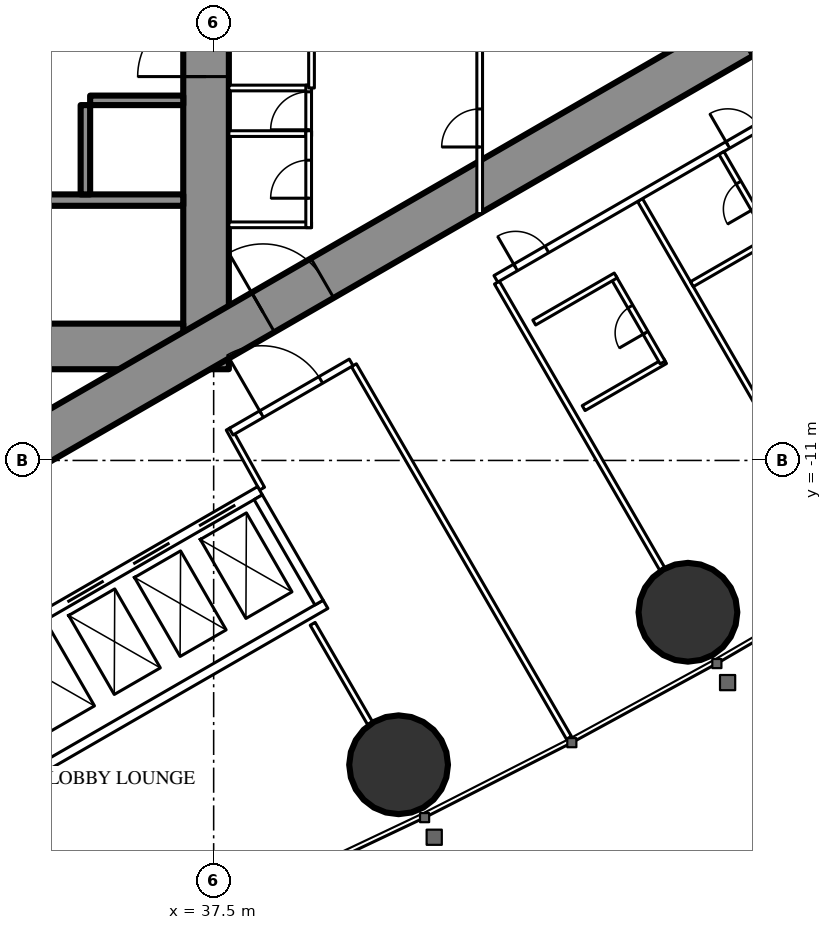
"""IFC4 building model, lengths in metres.
Left out: names, types, materials, properties, quantities, classifications, styles, units other than length and angle.
Written with IfcOpenShell. Run it as: python <this file> out.ifc"""

import sys

from ifc_helpers import new_model, si_unit, direction, frame, frame_2d, origin, origin_2d, place, context, subcontext, project, spatial, rectangle, hollow_circle, extrude, element, fill, save


model = new_model("IFC4")
c1 = context("Model", 3, precision=1e-05, world=origin(), true_north=direction((0.0, 1.0)))
c2 = subcontext(c1, "Body", "Model", "MODEL_VIEW")
j1 = project(units=[si_unit("LENGTHUNIT", "METRE"), si_unit("PLANEANGLEUNIT", "RADIAN")], contexts=[c1])
p1 = place(None, origin())
s1 = spatial("IfcSite", under=j1, at=p1, CompositionType="ELEMENT")
p2 = place(p1, origin())
s2 = spatial("IfcBuilding", under=s1, at=p2, CompositionType="ELEMENT")
p3 = place(p2, frame((0.0, 0.0, 125.6)))
s3 = spatial("IfcBuildingStorey", under=s2, at=p3, CompositionType="ELEMENT", Elevation=125.6)
for number, where, z_axis, x_axis in (
    (1, (42.366, -19.007, 0.0), (0.0, 0.0, 1.0), (1.0, 0.0, 0.0)),
    (2, (49.979, -14.994, 0.0), (0.0, 0.0, 1.0), (1.0, 0.0, 0.0)),
):
    element("IfcColumn", number, at=place(p3, frame(where, z_axis=z_axis, x_axis=x_axis)), inside=s3, PredefinedType="COLUMN", context=c2, shape_type="SweptSolid", body=[
        extrude(hollow_circle(Radius=1.3, WallThickness=0.1, at=origin_2d()), origin(), (0.0, 0.0, 1.0), 3.5),
    ])
p4 = place(p3, frame((37.3, -8.6, 0.0), z_axis=(0.0, 0.0, 1.0), x_axis=(0.0, 1.0, 0.0)))
e3 = element("IfcWall", 3, at=p4, inside=s3, PredefinedType="SHEAR", context=c2, shape_type="SweptSolid", body=[
    extrude(rectangle(XDim=17.2, YDim=1.2, at=frame_2d((8.6, 0.0))), origin(), (0.0, 0.0, 1.0), 3.5),
])
p5 = place(p4, frame((7.7, 0.0, 0.0)))
e4 = element("IfcOpeningElement", 4, at=p5, cuts=e3, PredefinedType="OPENING", context=c2, shape_type="SweptSolid", body=[
    extrude(rectangle(XDim=1.8, YDim=2.2, at=frame_2d((0.9, 1.1))), frame((0.0, 0.61, 0.0), z_axis=(0.0, -1.0, 0.0), x_axis=(1.0, 0.0, 0.0)), (0.0, 0.0, 1.0), 1.22),
])
p6 = place(p3, frame((28.3, -8.0, 0.0), z_axis=(0.0, 0.0, 1.0), x_axis=(1.0, 0.0, 0.0)))
e5 = element("IfcWall", 5, at=p6, inside=s3, PredefinedType="SHEAR", context=c2, shape_type="SweptSolid", body=[
    extrude(rectangle(XDim=8.4, YDim=1.2, at=frame_2d((4.2, 0.0))), origin(), (0.0, 0.0, 1.0), 3.5),
])
p7 = place(p6, frame((0.25, 0.0, 0.0)))
e6 = element("IfcOpeningElement", 6, at=p7, cuts=e5, PredefinedType="OPENING", context=c2, shape_type="SweptSolid", body=[
    extrude(rectangle(XDim=1.0, YDim=2.2, at=frame_2d((0.5, 1.1))), frame((0.0, 0.61, 0.0), z_axis=(0.0, -1.0, 0.0), x_axis=(1.0, 0.0, 0.0)), (0.0, 0.0, 1.0), 1.22),
])
p8 = place(p3, frame((28.3, -4.15, 0.0), z_axis=(0.0, 0.0, 1.0), x_axis=(1.0, 0.0, 0.0)))
e7 = element("IfcWall", 7, at=p8, inside=s3, PredefinedType="SHEAR", context=c2, shape_type="SweptSolid", body=[
    extrude(rectangle(XDim=8.4, YDim=0.3, at=frame_2d((4.2, 0.0))), origin(), (0.0, 0.0, 1.0), 3.5),
])
p9 = place(p3, frame((34.125, -4.0, 0.0), z_axis=(0.0, 0.0, 1.0), x_axis=(0.0, 1.0, 0.0)))
e8 = element("IfcWall", 8, at=p9, inside=s3, PredefinedType="SHEAR", context=c2, shape_type="SweptSolid", body=[
    extrude(rectangle(XDim=2.35, YDim=0.25, at=frame_2d((1.175, 0.0))), origin(), (0.0, 0.0, 1.0), 3.5),
])
p10 = place(p3, frame((34.25, -1.525, 0.0), z_axis=(0.0, 0.0, 1.0), x_axis=(1.0, 0.0, 0.0)))
e9 = element("IfcWall", 9, at=p10, inside=s3, PredefinedType="SHEAR", context=c2, shape_type="SweptSolid", body=[
    extrude(rectangle(XDim=2.45, YDim=0.25, at=frame_2d((1.225, 0.0))), origin(), (0.0, 0.0, 1.0), 3.5),
])
p11 = place(p3, frame((27.2, -13.8, 0.0), z_axis=(0.0, 0.0, 1.0), x_axis=(0.866027159892, 0.499996958321, 0.0)))
e10 = element("IfcWall", 10, at=p11, inside=s3, PredefinedType="SHEAR", context=c2, shape_type="SweptSolid", body=[
    extrude(rectangle(XDim=27.947, YDim=1.2, at=frame_2d((13.973, 0.0))), origin(), (0.0, 0.0, 1.0), 3.5),
])
p12 = place(p11, frame((4.6, 0.0, 0.0)))
e11 = element("IfcOpeningElement", 11, at=p12, cuts=e10, PredefinedType="OPENING", context=c2, shape_type="SweptSolid", body=[
    extrude(rectangle(XDim=1.0, YDim=2.2, at=frame_2d((0.5, 1.1))), frame((0.0, 0.61, 0.0), z_axis=(0.0, -1.0, 0.0), x_axis=(1.0, 0.0, 0.0)), (0.0, 0.0, 1.0), 1.22),
])
p13 = place(p11, frame((13.395, 0.0, 0.0)))
e12 = element("IfcOpeningElement", 12, at=p13, cuts=e10, PredefinedType="OPENING", context=c2, shape_type="SweptSolid", body=[
    extrude(rectangle(XDim=1.8, YDim=2.2, at=frame_2d((0.9, 1.1))), frame((0.0, 0.61, 0.0), z_axis=(0.0, -1.0, 0.0), x_axis=(1.0, 0.0, 0.0)), (0.0, 0.0, 1.0), 1.22),
])
p14 = place(p3, frame((41.19, -8.494, 0.0), z_axis=(0.0, 0.0, 1.0), x_axis=(0.49999258054, -0.866029687369, 0.0)))
e13 = element("IfcWall", 13, at=p14, inside=s3, PredefinedType="PARTITIONING", context=c2, shape_type="SweptSolid", body=[
    extrude(rectangle(XDim=11.318, YDim=0.15, at=frame_2d((5.659, 0.0))), origin(), (0.0, 0.0, 1.0), 3.25),
])
p15 = place(p3, frame((44.954, -6.321, 0.0), z_axis=(0.0, 0.0, 1.0), x_axis=(0.500018676722, -0.866014620505, 0.0)))
e14 = element("IfcWall", 14, at=p15, inside=s3, PredefinedType="PARTITIONING", context=c2, shape_type="SweptSolid", body=[
    extrude(rectangle(XDim=8.704, YDim=0.15, at=frame_2d((4.352, 0.0))), origin(), (0.0, 0.0, 1.0), 2.2),
])
p16 = place(p3, frame((48.719, -4.147, 0.0), z_axis=(0.0, 0.0, 1.0), x_axis=(0.499990498062, -0.866030889661, 0.0)))
e15 = element("IfcWall", 15, at=p16, inside=s3, PredefinedType="PARTITIONING", context=c2, shape_type="SweptSolid", body=[
    extrude(rectangle(XDim=11.406, YDim=0.15, at=frame_2d((5.703, 0.0))), origin(), (0.0, 0.0, 1.0), 3.25),
])
p17 = place(p3, frame((40.105, -15.299, 0.0), z_axis=(0.0, 0.0, 1.0), x_axis=(0.499978822259, -0.866037630414, 0.0)))
e16 = element("IfcWall", 16, at=p17, inside=s3, PredefinedType="PARTITIONING", context=c2, shape_type="SweptSolid", body=[
    extrude(rectangle(XDim=3.023, YDim=0.15, at=frame_2d((1.511, 0.0))), origin(), (0.0, 0.0, 1.0), 3.25),
])
p18 = place(p3, frame((38.773, -11.742, 0.0), z_axis=(0.0, 0.0, 1.0), x_axis=(-0.485528096672, 0.8742210632, 0.0)))
e17 = element("IfcWall", 17, at=p18, inside=s3, PredefinedType="PARTITIONING", context=c2, shape_type="SweptSolid", body=[
    extrude(rectangle(XDim=1.805, YDim=0.15, at=frame_2d((0.903, 0.0))), origin(), (0.0, 0.0, 1.0), 3.25),
])
p19 = place(p3, frame((37.96, -10.243, 0.0), z_axis=(0.0, 0.0, 1.0), x_axis=(0.866042886279, 0.499969718208, 0.0)))
e18 = element("IfcWall", 18, at=p19, inside=s3, PredefinedType="PARTITIONING", context=c2, shape_type="SweptSolid", body=[
    extrude(rectangle(XDim=3.647, YDim=0.2, at=frame_2d((1.823, 0.0))), origin(), (0.0, 0.0, 1.0), 3.25),
])
p20 = place(p19, frame((0.923, 0.0, 0.0)))
e19 = element("IfcOpeningElement", 19, at=p20, cuts=e18, PredefinedType="OPENING", context=c2, shape_type="SweptSolid", body=[
    extrude(rectangle(XDim=1.8, YDim=2.2, at=frame_2d((0.9, 1.1))), frame((0.0, 0.11, 0.0), z_axis=(0.0, -1.0, 0.0), x_axis=(1.0, 0.0, 0.0)), (0.0, 0.0, 1.0), 0.22),
])
p21 = place(p3, frame((44.925, -6.222, 0.0), z_axis=(0.0, 0.0, 1.0), x_axis=(0.866020269055, 0.500008893506, 0.0)))
e20 = element("IfcWall", 20, at=p21, inside=s3, PredefinedType="PARTITIONING", context=c2, shape_type="SweptSolid", body=[
    extrude(rectangle(XDim=12.444, YDim=0.2, at=frame_2d((6.222, 0.0))), origin(), (0.0, 0.0, 1.0), 3.25),
])
p22 = place(p21, frame((0.6, 0.0, 0.0)))
e21 = element("IfcOpeningElement", 21, at=p22, cuts=e20, PredefinedType="OPENING", context=c2, shape_type="SweptSolid", body=[
    extrude(rectangle(XDim=0.95, YDim=2.2, at=frame_2d((0.475, 1.1))), frame((0.0, 0.11, 0.0), z_axis=(0.0, -1.0, 0.0), x_axis=(1.0, 0.0, 0.0)), (0.0, 0.0, 1.0), 0.22),
])
p23 = place(p21, frame((7.047, 0.0, 0.0)))
e22 = element("IfcOpeningElement", 22, at=p23, cuts=e20, PredefinedType="OPENING", context=c2, shape_type="SweptSolid", body=[
    extrude(rectangle(XDim=0.95, YDim=2.2, at=frame_2d((0.475, 1.1))), frame((0.0, 0.11, 0.0), z_axis=(0.0, -1.0, 0.0), x_axis=(1.0, 0.0, 0.0)), (0.0, 0.0, 1.0), 0.22),
])
p24 = place(p3, frame((47.235, -9.623, 0.0), z_axis=(0.0, 0.0, 1.0), x_axis=(0.866006523861, 0.500032699561, 0.0)))
e23 = element("IfcWall", 23, at=p24, inside=s3, PredefinedType="PARTITIONING", context=c2, shape_type="SweptSolid", body=[
    extrude(rectangle(XDim=2.475, YDim=0.15, at=frame_2d((1.237, 0.0))), origin(), (0.0, 0.0, 1.0), 3.25),
])
p25 = place(p3, frame((48.013, -6.171, 0.0), z_axis=(0.0, 0.0, 1.0), x_axis=(0.500006934395, -0.866021400173, 0.0)))
e24 = element("IfcWall", 24, at=p25, inside=s3, PredefinedType="PARTITIONING", context=c2, shape_type="SweptSolid", body=[
    extrude(rectangle(XDim=2.6, YDim=0.15, at=frame_2d((1.3, 0.0))), origin(), (0.0, 0.0, 1.0), 3.25),
])
p26 = place(p25, frame((0.9, 0.0, 0.0)))
e25 = element("IfcOpeningElement", 25, at=p26, cuts=e24, PredefinedType="OPENING", context=c2, shape_type="SweptSolid", body=[
    extrude(rectangle(XDim=0.8, YDim=2.2, at=frame_2d((0.4, 1.1))), frame((0.0, 0.085, 0.0), z_axis=(0.0, -1.0, 0.0), x_axis=(1.0, 0.0, 0.0)), (0.0, 0.0, 1.0), 0.17),
])
p27 = place(p3, frame((45.935, -7.371, 0.0), z_axis=(0.0, 0.0, 1.0), x_axis=(0.866031185235, 0.4999899861, 0.0)))
e26 = element("IfcWall", 26, at=p27, inside=s3, PredefinedType="PARTITIONING", context=c2, shape_type="SweptSolid", body=[
    extrude(rectangle(XDim=2.475, YDim=0.15, at=frame_2d((1.238, 0.0))), origin(), (0.0, 0.0, 1.0), 3.25),
])
p28 = place(p3, frame((50.083, -6.362, 0.0), z_axis=(0.0, 0.0, 1.0), x_axis=(0.866006523861, 0.500032699561, 0.0)))
e27 = element("IfcWall", 27, at=p28, inside=s3, PredefinedType="PARTITIONING", context=c2, shape_type="SweptSolid", body=[
    extrude(rectangle(XDim=2.475, YDim=0.15, at=frame_2d((1.237, 0.0))), origin(), (0.0, 0.0, 1.0), 3.25),
])
p29 = place(p3, frame((50.862, -2.91, 0.0), z_axis=(0.0, 0.0, 1.0), x_axis=(0.500047596559, -0.865997922154, 0.0)))
e28 = element("IfcWall", 28, at=p29, inside=s3, PredefinedType="PARTITIONING", context=c2, shape_type="SweptSolid", body=[
    extrude(rectangle(XDim=2.6, YDim=0.15, at=frame_2d((1.3, 0.0))), origin(), (0.0, 0.0, 1.0), 3.25),
])
p30 = place(p29, frame((0.9, 0.0, 0.0)))
e29 = element("IfcOpeningElement", 29, at=p30, cuts=e28, PredefinedType="OPENING", context=c2, shape_type="SweptSolid", body=[
    extrude(rectangle(XDim=0.8, YDim=2.2, at=frame_2d((0.4, 1.1))), frame((0.0, 0.085, 0.0), z_axis=(0.0, -1.0, 0.0), x_axis=(1.0, 0.0, 0.0)), (0.0, 0.0, 1.0), 0.17),
])
for number, where, z_axis, x_axis in (
    (30, (37.9, -1.2, 0.0), (0.0, 0.0, 1.0), (1.0, 0.0, 0.0)),
    (31, (37.9, -2.4, 0.0), (0.0, 0.0, 1.0), (1.0, 0.0, 0.0)),
    (32, (37.9, -4.8, 0.0), (0.0, 0.0, 1.0), (1.0, 0.0, 0.0)),
):
    element("IfcWall", number, at=place(p3, frame(where, z_axis=z_axis, x_axis=x_axis)), inside=s3, PredefinedType="PARTITIONING", context=c2, shape_type="SweptSolid", body=[
        extrude(rectangle(XDim=2.175, YDim=0.15, at=frame_2d((1.087, 0.0))), origin(), (0.0, 0.0, 1.0), 3.25),
    ])
p31 = place(p3, frame((40.0, -2.475, 0.0), z_axis=(0.0, 0.0, 1.0), x_axis=(0.0, 1.0, 0.0)))
e33 = element("IfcWall", 33, at=p31, inside=s3, PredefinedType="PARTITIONING", context=c2, shape_type="SweptSolid", body=[
    extrude(rectangle(XDim=1.35, YDim=0.15, at=frame_2d((0.675, 0.0))), origin(), (0.0, 0.0, 1.0), 3.25),
])
p32 = place(p31, frame((0.175, 0.0, 0.0)))
e34 = element("IfcOpeningElement", 34, at=p32, cuts=e33, PredefinedType="OPENING", context=c2, shape_type="SweptSolid", body=[
    extrude(rectangle(XDim=1.0, YDim=2.2, at=frame_2d((0.5, 1.1))), frame((0.0, 0.085, 0.0), z_axis=(0.0, -1.0, 0.0), x_axis=(1.0, 0.0, 0.0)), (0.0, 0.0, 1.0), 0.17),
])
p33 = place(p3, frame((40.0, -4.875, 0.0), z_axis=(0.0, 0.0, 1.0), x_axis=(0.0, 1.0, 0.0)))
e35 = element("IfcWall", 35, at=p33, inside=s3, PredefinedType="PARTITIONING", context=c2, shape_type="SweptSolid", body=[
    extrude(rectangle(XDim=2.55, YDim=0.15, at=frame_2d((1.275, 0.0))), origin(), (0.0, 0.0, 1.0), 3.25),
])
p34 = place(p33, frame((0.775, 0.0, 0.0)))
e36 = element("IfcOpeningElement", 36, at=p34, cuts=e35, PredefinedType="OPENING", context=c2, shape_type="SweptSolid", body=[
    extrude(rectangle(XDim=1.0, YDim=2.2, at=frame_2d((0.5, 1.1))), frame((0.0, 0.085, 0.0), z_axis=(0.0, -1.0, 0.0), x_axis=(1.0, 0.0, 0.0)), (0.0, 0.0, 1.0), 0.17),
])
p35 = place(p3, frame((40.075, -1.2, 0.0), z_axis=(0.0, 0.0, 1.0), x_axis=(0.0, 1.0, 0.0)))
e37 = element("IfcWall", 37, at=p35, inside=s3, PredefinedType="PARTITIONING", context=c2, shape_type="SweptSolid", body=[
    extrude(rectangle(XDim=6.874, YDim=0.15, at=frame_2d((3.437, 0.0))), origin(), (0.0, 0.0, 1.0), 3.25),
])
p36 = place(p35, frame((2.537, 0.0, 0.0)))
e38 = element("IfcOpeningElement", 38, at=p36, cuts=e37, PredefinedType="OPENING", context=c2, shape_type="SweptSolid", body=[
    extrude(rectangle(XDim=1.8, YDim=2.2, at=frame_2d((0.9, 1.1))), frame((0.0, 0.085, 0.0), z_axis=(0.0, -1.0, 0.0), x_axis=(1.0, 0.0, 0.0)), (0.0, 0.0, 1.0), 0.17),
])
p37 = place(p3, frame((44.5, -4.505, 0.0), z_axis=(0.0, 0.0, 1.0), x_axis=(0.0, 1.0, 0.0)))
e39 = element("IfcWall", 39, at=p37, inside=s3, PredefinedType="PARTITIONING", context=c2, shape_type="SweptSolid", body=[
    extrude(rectangle(XDim=9.009, YDim=0.15, at=frame_2d((4.505, 0.0))), origin(), (0.0, 0.0, 1.0), 2.45),
])
p38 = place(p37, frame((1.752, 0.0, 0.0)))
e40 = element("IfcOpeningElement", 40, at=p38, cuts=e39, PredefinedType="OPENING", context=c2, shape_type="SweptSolid", body=[
    extrude(rectangle(XDim=1.0, YDim=2.2, at=frame_2d((0.5, 1.1))), frame((0.0, 0.085, 0.0), z_axis=(0.0, -1.0, 0.0), x_axis=(1.0, 0.0, 0.0)), (0.0, 0.0, 1.0), 0.17),
])
p39 = place(p37, frame((6.257, 0.0, 0.0)))
e41 = element("IfcOpeningElement", 41, at=p39, cuts=e39, PredefinedType="OPENING", context=c2, shape_type="SweptSolid", body=[
    extrude(rectangle(XDim=1.0, YDim=2.2, at=frame_2d((0.5, 1.1))), frame((0.0, 0.085, 0.0), z_axis=(0.0, -1.0, 0.0), x_axis=(1.0, 0.0, 0.0)), (0.0, 0.0, 1.0), 0.17),
])
p40 = place(p3, frame((31.271, -16.097, 0.0), z_axis=(0.0, 0.0, 1.0), x_axis=(0.86604045752, 0.499973925258, 0.0)))
e42 = element("IfcWall", 42, at=p40, inside=s3, PredefinedType="PARTITIONING", context=c2, shape_type="SweptSolid", body=[
    extrude(rectangle(XDim=8.6, YDim=0.25, at=frame_2d((4.3, 0.0))), origin(), (0.0, 0.0, 1.0), 3.25),
])
p41 = place(p40, frame((0.75, 0.0, 0.0)))
e43 = element("IfcOpeningElement", 43, at=p41, cuts=e42, PredefinedType="OPENING", context=c2, shape_type="SweptSolid", body=[
    extrude(rectangle(XDim=1.1, YDim=2.2, at=frame_2d((0.55, 1.1))), frame((0.0, 0.135, 0.0), z_axis=(0.0, -1.0, 0.0), x_axis=(1.0, 0.0, 0.0)), (0.0, 0.0, 1.0), 0.27),
])
p42 = place(p40, frame((2.75, 0.0, 0.0)))
e44 = element("IfcOpeningElement", 44, at=p42, cuts=e42, PredefinedType="OPENING", context=c2, shape_type="SweptSolid", body=[
    extrude(rectangle(XDim=1.1, YDim=2.2, at=frame_2d((0.55, 1.1))), frame((0.0, 0.135, 0.0), z_axis=(0.0, -1.0, 0.0), x_axis=(1.0, 0.0, 0.0)), (0.0, 0.0, 1.0), 0.27),
])
p43 = place(p40, frame((4.75, 0.0, 0.0)))
e45 = element("IfcOpeningElement", 45, at=p43, cuts=e42, PredefinedType="OPENING", context=c2, shape_type="SweptSolid", body=[
    extrude(rectangle(XDim=1.1, YDim=2.2, at=frame_2d((0.55, 1.1))), frame((0.0, 0.135, 0.0), z_axis=(0.0, -1.0, 0.0), x_axis=(1.0, 0.0, 0.0)), (0.0, 0.0, 1.0), 0.27),
])
p44 = place(p40, frame((6.75, 0.0, 0.0)))
e46 = element("IfcOpeningElement", 46, at=p44, cuts=e42, PredefinedType="OPENING", context=c2, shape_type="SweptSolid", body=[
    extrude(rectangle(XDim=1.1, YDim=2.2, at=frame_2d((0.55, 1.1))), frame((0.0, 0.135, 0.0), z_axis=(0.0, -1.0, 0.0), x_axis=(1.0, 0.0, 0.0)), (0.0, 0.0, 1.0), 0.27),
])
p45 = place(p3, frame((32.996, -19.086, 0.0), z_axis=(0.0, 0.0, 1.0), x_axis=(0.866028165386, 0.499995216735, 0.0)))
e47 = element("IfcWall", 47, at=p45, inside=s3, PredefinedType="PARTITIONING", context=c2, shape_type="SweptSolid", body=[
    extrude(rectangle(XDim=8.6, YDim=0.25, at=frame_2d((4.3, 0.0))), origin(), (0.0, 0.0, 1.0), 3.25),
])
p46 = place(p3, frame((38.673, -11.968, 0.0), z_axis=(0.0, 0.0, 1.0), x_axis=(0.499929347863, -0.866066190972, 0.0)))
e48 = element("IfcWall", 48, at=p46, inside=s3, PredefinedType="PARTITIONING", context=c2, shape_type="SweptSolid", body=[
    extrude(rectangle(XDim=3.201, YDim=0.25, at=frame_2d((1.6, 0.0))), origin(), (0.0, 0.0, 1.0), 3.25),
])
p47 = place(p26, origin())
e49 = element("IfcDoor", 49, at=p47, inside=s3, OperationType="SINGLE_SWING_RIGHT", PredefinedType="DOOR", context=c2, shape_type="SweptSolid", body=[
    extrude(rectangle(XDim=0.8, YDim=2.2, at=frame_2d((0.4, 1.1))), frame((0.0, 0.025, 0.0), z_axis=(0.0, -1.0, 0.0), x_axis=(1.0, 0.0, 0.0)), (0.0, 0.0, 1.0), 0.05),
])
fill(e25, e49)
p48 = place(p22, origin())
e50 = element("IfcDoor", 50, at=p48, inside=s3, OperationType="SINGLE_SWING_LEFT", PredefinedType="DOOR", context=c2, shape_type="SweptSolid", body=[
    extrude(rectangle(XDim=0.95, YDim=2.2, at=frame_2d((0.475, 1.1))), frame((0.0, 0.025, 0.0), z_axis=(0.0, -1.0, 0.0), x_axis=(1.0, 0.0, 0.0)), (0.0, 0.0, 1.0), 0.05),
])
fill(e21, e50)
p49 = place(p30, origin())
e51 = element("IfcDoor", 51, at=p49, inside=s3, OperationType="SINGLE_SWING_RIGHT", PredefinedType="DOOR", context=c2, shape_type="SweptSolid", body=[
    extrude(rectangle(XDim=0.8, YDim=2.2, at=frame_2d((0.4, 1.1))), frame((0.0, 0.025, 0.0), z_axis=(0.0, -1.0, 0.0), x_axis=(1.0, 0.0, 0.0)), (0.0, 0.0, 1.0), 0.05),
])
fill(e29, e51)
p50 = place(p23, origin())
e52 = element("IfcDoor", 52, at=p50, inside=s3, OperationType="SINGLE_SWING_LEFT", PredefinedType="DOOR", context=c2, shape_type="SweptSolid", body=[
    extrude(rectangle(XDim=0.95, YDim=2.2, at=frame_2d((0.475, 1.1))), frame((0.0, 0.025, 0.0), z_axis=(0.0, -1.0, 0.0), x_axis=(1.0, 0.0, 0.0)), (0.0, 0.0, 1.0), 0.05),
])
fill(e22, e52)
p51 = place(p20, origin())
e53 = element("IfcDoor", 53, at=p51, inside=s3, OperationType="DOUBLE_DOOR_SINGLE_SWING", PredefinedType="DOOR", context=c2, shape_type="SweptSolid", body=[
    extrude(rectangle(XDim=1.8, YDim=2.2, at=frame_2d((0.9, 1.1))), frame((0.0, 0.025, 0.0), z_axis=(0.0, -1.0, 0.0), x_axis=(1.0, 0.0, 0.0)), (0.0, 0.0, 1.0), 0.05),
])
fill(e19, e53)
p52 = place(p32, origin())
e54 = element("IfcDoor", 54, at=p52, inside=s3, OperationType="SINGLE_SWING_LEFT", PredefinedType="DOOR", context=c2, shape_type="SweptSolid", body=[
    extrude(rectangle(XDim=1.0, YDim=2.2, at=frame_2d((0.5, 1.1))), frame((0.0, 0.025, 0.0), z_axis=(0.0, -1.0, 0.0), x_axis=(1.0, 0.0, 0.0)), (0.0, 0.0, 1.0), 0.05),
])
fill(e34, e54)
p53 = place(p34, origin())
e55 = element("IfcDoor", 55, at=p53, inside=s3, OperationType="SINGLE_SWING_LEFT", PredefinedType="DOOR", context=c2, shape_type="SweptSolid", body=[
    extrude(rectangle(XDim=1.0, YDim=2.2, at=frame_2d((0.5, 1.1))), frame((0.0, 0.025, 0.0), z_axis=(0.0, -1.0, 0.0), x_axis=(1.0, 0.0, 0.0)), (0.0, 0.0, 1.0), 0.05),
])
fill(e36, e55)
p54 = place(p38, origin())
e56 = element("IfcDoor", 56, at=p54, inside=s3, OperationType="SINGLE_SWING_LEFT", PredefinedType="DOOR", context=c2, shape_type="SweptSolid", body=[
    extrude(rectangle(XDim=1.0, YDim=2.2, at=frame_2d((0.5, 1.1))), frame((0.0, 0.025, 0.0), z_axis=(0.0, -1.0, 0.0), x_axis=(1.0, 0.0, 0.0)), (0.0, 0.0, 1.0), 0.05),
])
fill(e40, e56)
p55 = place(p13, origin())
e57 = element("IfcDoor", 57, at=p55, inside=s3, OperationType="DOUBLE_DOOR_SINGLE_SWING", PredefinedType="DOOR", context=c2, shape_type="SweptSolid", body=[
    extrude(rectangle(XDim=1.8, YDim=2.2, at=frame_2d((0.9, 1.1))), frame((0.0, 0.025, 0.0), z_axis=(0.0, -1.0, 0.0), x_axis=(1.0, 0.0, 0.0)), (0.0, 0.0, 1.0), 0.05),
])
fill(e12, e57)
p56 = place(p5, origin())
e58 = element("IfcDoor", 58, at=p56, inside=s3, OperationType="DOUBLE_DOOR_SINGLE_SWING", PredefinedType="DOOR", context=c2, shape_type="SweptSolid", body=[
    extrude(rectangle(XDim=1.8, YDim=2.2, at=frame_2d((0.9, 1.1))), frame((0.0, 0.025, 0.0), z_axis=(0.0, -1.0, 0.0), x_axis=(1.0, 0.0, 0.0)), (0.0, 0.0, 1.0), 0.05),
])
fill(e4, e58)
p57 = place(p42, origin())
e59 = element("IfcDoor", 59, at=p57, inside=s3, OperationType="DOUBLE_DOOR_SLIDING", PredefinedType="USERDEFINED", context=c2, shape_type="SweptSolid", body=[
    extrude(rectangle(XDim=1.1, YDim=2.2, at=frame_2d((0.55, 1.1))), frame((0.0, 0.025, 0.0), z_axis=(0.0, -1.0, 0.0), x_axis=(1.0, 0.0, 0.0)), (0.0, 0.0, 1.0), 0.05),
])
fill(e44, e59)
p58 = place(p43, origin())
e60 = element("IfcDoor", 60, at=p58, inside=s3, OperationType="DOUBLE_DOOR_SLIDING", PredefinedType="USERDEFINED", context=c2, shape_type="SweptSolid", body=[
    extrude(rectangle(XDim=1.1, YDim=2.2, at=frame_2d((0.55, 1.1))), frame((0.0, 0.025, 0.0), z_axis=(0.0, -1.0, 0.0), x_axis=(1.0, 0.0, 0.0)), (0.0, 0.0, 1.0), 0.05),
])
fill(e45, e60)
p59 = place(p44, origin())
e61 = element("IfcDoor", 61, at=p59, inside=s3, OperationType="DOUBLE_DOOR_SLIDING", PredefinedType="USERDEFINED", context=c2, shape_type="SweptSolid", body=[
    extrude(rectangle(XDim=1.1, YDim=2.2, at=frame_2d((0.55, 1.1))), frame((0.0, 0.025, 0.0), z_axis=(0.0, -1.0, 0.0), x_axis=(1.0, 0.0, 0.0)), (0.0, 0.0, 1.0), 0.05),
])
fill(e46, e61)
save(model, sys.argv[1])
